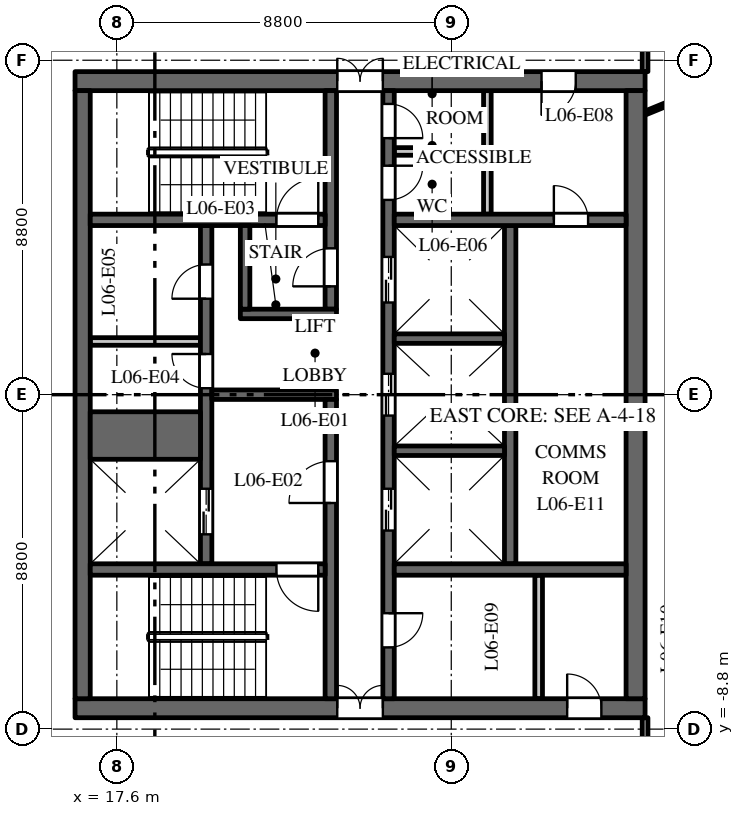
"""IFC4 building model, lengths in metres.
Left out: names, types, materials, properties, quantities, classifications, styles, units other than length and angle.
Written with IfcOpenShell. Run it as: python <this file> out.ifc"""

import sys

from ifc_helpers import new_model, si_unit, direction, frame, frame_2d, origin, place, context, subcontext, project, spatial, rectangle, extrude, element, fill, save


model = new_model("IFC4")
c1 = context("Model", 3, precision=1e-05, world=origin(), true_north=direction((0.0, 1.0)))
c2 = subcontext(c1, "Body", "Model", "MODEL_VIEW")
j1 = project(units=[si_unit("LENGTHUNIT", "METRE"), si_unit("PLANEANGLEUNIT", "RADIAN")], contexts=[c1])
p1 = place(None, origin())
s1 = spatial("IfcSite", under=j1, at=p1, CompositionType="ELEMENT")
p2 = place(p1, origin())
s2 = spatial("IfcBuilding", under=s1, at=p2, CompositionType="ELEMENT")
p3 = place(p2, frame((0.0, 0.0, 34.5)))
s3 = spatial("IfcBuildingStorey", under=s2, at=p3, CompositionType="ELEMENT", Elevation=34.5)
p4 = place(p3, frame((16.5, 8.25, 0.0), z_axis=(0.0, 0.0, 1.0), x_axis=(1.0, 0.0, 0.0)))
e1 = element("IfcWall", 1, at=p4, inside=s3, PredefinedType="SHEAR", context=c2, shape_type="SweptSolid", body=[
    extrude(rectangle(XDim=15.0, YDim=0.5, at=frame_2d((7.5, 0.0))), origin(), (0.0, 0.0, 1.0), 3.7),
])
p5 = place(p4, frame((6.9, 0.0, 0.0)))
e2 = element("IfcOpeningElement", 2, at=p5, cuts=e1, PredefinedType="OPENING", context=c2, shape_type="SweptSolid", body=[
    extrude(rectangle(XDim=1.2, YDim=2.1, at=frame_2d((0.6, 1.05))), frame((0.0, 0.26, 0.0), z_axis=(0.0, -1.0, 0.0), x_axis=(1.0, 0.0, 0.0)), (0.0, 0.0, 1.0), 0.52),
])
p6 = place(p4, frame((12.275, 0.0, 0.0)))
e3 = element("IfcOpeningElement", 3, at=p6, cuts=e1, PredefinedType="OPENING", context=c2, shape_type="SweptSolid", body=[
    extrude(rectangle(XDim=0.9, YDim=2.1, at=frame_2d((0.45, 1.05))), frame((0.0, 0.26, 0.0), z_axis=(0.0, -1.0, 0.0), x_axis=(1.0, 0.0, 0.0)), (0.0, 0.0, 1.0), 0.52),
])
p7 = place(p3, frame((16.5, -8.25, 0.0), z_axis=(0.0, 0.0, 1.0), x_axis=(1.0, 0.0, 0.0)))
e4 = element("IfcWall", 4, at=p7, inside=s3, PredefinedType="SHEAR", context=c2, shape_type="SweptSolid", body=[
    extrude(rectangle(XDim=15.0, YDim=0.5, at=frame_2d((7.5, 0.0))), origin(), (0.0, 0.0, 1.0), 3.7),
])
p8 = place(p7, frame((6.9, 0.0, 0.0)))
e5 = element("IfcOpeningElement", 5, at=p8, cuts=e4, PredefinedType="OPENING", context=c2, shape_type="SweptSolid", body=[
    extrude(rectangle(XDim=1.2, YDim=2.1, at=frame_2d((0.6, 1.05))), frame((0.0, 0.26, 0.0), z_axis=(0.0, -1.0, 0.0), x_axis=(1.0, 0.0, 0.0)), (0.0, 0.0, 1.0), 0.52),
])
p9 = place(p7, frame((12.95, 0.0, 0.0)))
e6 = element("IfcOpeningElement", 6, at=p9, cuts=e4, PredefinedType="OPENING", context=c2, shape_type="SweptSolid", body=[
    extrude(rectangle(XDim=0.9, YDim=2.1, at=frame_2d((0.45, 1.05))), frame((0.0, 0.26, 0.0), z_axis=(0.0, -1.0, 0.0), x_axis=(1.0, 0.0, 0.0)), (0.0, 0.0, 1.0), 0.52),
])
p10 = place(p3, frame((16.9, 1.4, 0.0), z_axis=(0.0, 0.0, 1.0), x_axis=(1.0, 0.0, 0.0)))
e7 = element("IfcWall", 7, at=p10, inside=s3, PredefinedType="PARTITIONING", context=c2, shape_type="SweptSolid", body=[
    extrude(rectangle(XDim=2.9, YDim=0.2, at=frame_2d((1.45, 0.0))), origin(), (0.0, 0.0, 1.0), 3.7),
])
p11 = place(p3, frame((27.95, -4.45, 0.0), z_axis=(0.0, 0.0, 1.0), x_axis=(0.0, 1.0, 0.0)))
e8 = element("IfcWall", 8, at=p11, inside=s3, PredefinedType="SHEAR", context=c2, shape_type="SweptSolid", body=[
    extrude(rectangle(XDim=8.9, YDim=0.3, at=frame_2d((4.45, 0.0))), origin(), (0.0, 0.0, 1.0), 3.7),
])
p12 = place(p3, frame((19.95, -4.45, 0.0), z_axis=(0.0, 0.0, 1.0), x_axis=(0.0, 1.0, 0.0)))
e9 = element("IfcWall", 9, at=p12, inside=s3, PredefinedType="SHEAR", context=c2, shape_type="SweptSolid", body=[
    extrude(rectangle(XDim=8.9, YDim=0.3, at=frame_2d((4.45, 0.0))), origin(), (0.0, 0.0, 1.0), 3.7),
])
p13 = place(p12, frame((0.775, 0.0, 0.0)))
e10 = element("IfcOpeningElement", 10, at=p13, cuts=e9, PredefinedType="OPENING", context=c2, shape_type="SweptSolid", body=[
    extrude(rectangle(XDim=1.2, YDim=2.1, at=frame_2d((0.6, 1.05))), frame((0.0, 0.16, 0.0), z_axis=(0.0, -1.0, 0.0), x_axis=(1.0, 0.0, 0.0)), (0.0, 0.0, 1.0), 0.32),
])
p14 = place(p12, frame((4.62, 0.0, 0.0)))
e11 = element("IfcOpeningElement", 11, at=p14, cuts=e9, PredefinedType="OPENING", context=c2, shape_type="SweptSolid", body=[
    extrude(rectangle(XDim=0.9, YDim=2.1, at=frame_2d((0.45, 1.05))), frame((0.0, 0.16, 0.0), z_axis=(0.0, -1.0, 0.0), x_axis=(1.0, 0.0, 0.0)), (0.0, 0.0, 1.0), 0.32),
])
p15 = place(p12, frame((6.975, 0.0, 0.0)))
e12 = element("IfcOpeningElement", 12, at=p15, cuts=e9, PredefinedType="OPENING", context=c2, shape_type="SweptSolid", body=[
    extrude(rectangle(XDim=0.9, YDim=2.1, at=frame_2d((0.45, 1.05))), frame((0.0, 0.16, 0.0), z_axis=(0.0, -1.0, 0.0), x_axis=(1.0, 0.0, 0.0)), (0.0, 0.0, 1.0), 0.32),
])
p16 = place(p3, frame((24.75, -8.0, 0.0), z_axis=(0.0, 0.0, 1.0), x_axis=(0.0, 1.0, 0.0)))
e13 = element("IfcWall", 13, at=p16, inside=s3, PredefinedType="SHEAR", context=c2, shape_type="SweptSolid", body=[
    extrude(rectangle(XDim=16.0, YDim=0.3, at=frame_2d((8.0, 0.0))), origin(), (0.0, 0.0, 1.0), 3.7),
])
p17 = place(p16, frame((4.425, 0.0, 0.0)))
e14 = element("IfcOpeningElement", 14, at=p17, cuts=e13, PredefinedType="OPENING", context=c2, shape_type="SweptSolid", body=[
    extrude(rectangle(XDim=1.1, YDim=2.1, at=frame_2d((0.55, 1.05))), frame((0.0, 0.16, 0.0), z_axis=(0.0, -1.0, 0.0), x_axis=(1.0, 0.0, 0.0)), (0.0, 0.0, 1.0), 0.32),
])
p18 = place(p16, frame((7.45, 0.0, 0.0)))
e15 = element("IfcOpeningElement", 15, at=p18, cuts=e13, PredefinedType="OPENING", context=c2, shape_type="SweptSolid", body=[
    extrude(rectangle(XDim=1.1, YDim=2.1, at=frame_2d((0.55, 1.05))), frame((0.0, 0.16, 0.0), z_axis=(0.0, -1.0, 0.0), x_axis=(1.0, 0.0, 0.0)), (0.0, 0.0, 1.0), 0.32),
])
p19 = place(p16, frame((10.425, 0.0, 0.0)))
e16 = element("IfcOpeningElement", 16, at=p19, cuts=e13, PredefinedType="OPENING", context=c2, shape_type="SweptSolid", body=[
    extrude(rectangle(XDim=1.2, YDim=2.1, at=frame_2d((0.6, 1.05))), frame((0.0, 0.16, 0.0), z_axis=(0.0, -1.0, 0.0), x_axis=(1.0, 0.0, 0.0)), (0.0, 0.0, 1.0), 0.32),
])
p20 = place(p16, frame((13.125, 0.0, 0.0)))
e17 = element("IfcOpeningElement", 17, at=p20, cuts=e13, PredefinedType="OPENING", context=c2, shape_type="SweptSolid", body=[
    extrude(rectangle(XDim=0.9, YDim=2.1, at=frame_2d((0.45, 1.05))), frame((0.0, 0.16, 0.0), z_axis=(0.0, -1.0, 0.0), x_axis=(1.0, 0.0, 0.0)), (0.0, 0.0, 1.0), 0.32),
])
p21 = place(p16, frame((14.75, 0.0, 0.0)))
e18 = element("IfcOpeningElement", 18, at=p21, cuts=e13, PredefinedType="OPENING", context=c2, shape_type="SweptSolid", body=[
    extrude(rectangle(XDim=0.9, YDim=2.1, at=frame_2d((0.45, 1.05))), frame((0.0, 0.16, 0.0), z_axis=(0.0, -1.0, 0.0), x_axis=(1.0, 0.0, 0.0)), (0.0, 0.0, 1.0), 0.32),
])
p22 = place(p16, frame((1.35, 0.0, 0.0)))
e19 = element("IfcOpeningElement", 19, at=p22, cuts=e13, PredefinedType="OPENING", context=c2, shape_type="SweptSolid", body=[
    extrude(rectangle(XDim=0.9, YDim=2.1, at=frame_2d((0.45, 1.05))), frame((0.0, 0.16, 0.0), z_axis=(0.0, -1.0, 0.0), x_axis=(1.0, 0.0, 0.0)), (0.0, 0.0, 1.0), 0.32),
])
p23 = place(p3, frame((20.1, 0.0, 0.0), z_axis=(0.0, 0.0, 1.0), x_axis=(1.0, 0.0, 0.0)))
e20 = element("IfcWall", 20, at=p23, inside=s3, PredefinedType="SHEAR", context=c2, shape_type="SweptSolid", body=[
    extrude(rectangle(XDim=3.28, YDim=0.25, at=frame_2d((1.64, 0.0))), origin(), (0.0, 0.0, 1.0), 3.7),
])
p24 = place(p3, frame((16.7, -8.0, 0.0), z_axis=(0.0, 0.0, 1.0), x_axis=(0.0, 1.0, 0.0)))
e21 = element("IfcWall", 21, at=p24, inside=s3, PredefinedType="SHEAR", context=c2, shape_type="SweptSolid", body=[
    extrude(rectangle(XDim=16.0, YDim=0.4, at=frame_2d((8.0, 0.0))), origin(), (0.0, 0.0, 1.0), 3.7),
])
p25 = place(p3, frame((31.25, -8.0, 0.0), z_axis=(0.0, 0.0, 1.0), x_axis=(0.0, 1.0, 0.0)))
e22 = element("IfcWall", 22, at=p25, inside=s3, PredefinedType="SHEAR", context=c2, shape_type="SweptSolid", body=[
    extrude(rectangle(XDim=16.0, YDim=0.5, at=frame_2d((8.0, 0.0))), origin(), (0.0, 0.0, 1.0), 3.7),
])
p26 = place(p3, frame((24.9, 4.6, 0.0), z_axis=(0.0, 0.0, 1.0), x_axis=(1.0, 0.0, 0.0)))
e23 = element("IfcWall", 23, at=p26, inside=s3, PredefinedType="SHEAR", context=c2, shape_type="SweptSolid", body=[
    extrude(rectangle(XDim=6.1, YDim=0.3, at=frame_2d((3.05, 0.0))), origin(), (0.0, 0.0, 1.0), 3.7),
])
p27 = place(p26, frame((4.2, 0.0, 0.0)))
e24 = element("IfcOpeningElement", 24, at=p27, cuts=e23, PredefinedType="OPENING", context=c2, shape_type="SweptSolid", body=[
    extrude(rectangle(XDim=0.9, YDim=2.1, at=frame_2d((0.45, 1.05))), frame((0.0, 0.16, 0.0), z_axis=(0.0, -1.0, 0.0), x_axis=(1.0, 0.0, 0.0)), (0.0, 0.0, 1.0), 0.32),
])
for number, where, z_axis, x_axis in (
    (25, (27.35, 4.75, 0.0), (0.0, 0.0, 1.0), (0.0, 1.0, 0.0)),
    (26, (28.7, -8.0, 0.0), (0.0, 0.0, 1.0), (0.0, 1.0, 0.0)),
):
    element("IfcWall", number, at=place(p3, frame(where, z_axis=z_axis, x_axis=x_axis)), inside=s3, PredefinedType="PARTITIONING", context=c2, shape_type="SweptSolid", body=[
        extrude(rectangle(XDim=3.25, YDim=0.2, at=frame_2d((1.625, 0.0))), origin(), (0.0, 0.0, 1.0), 3.7),
    ])
p28 = place(p3, frame((24.9, 6.4, 0.0), z_axis=(0.0, 0.0, 1.0), x_axis=(1.0, 0.0, 0.0)))
e27 = element("IfcWall", 27, at=p28, inside=s3, PredefinedType="PARTITIONING", context=c2, shape_type="SweptSolid", body=[
    extrude(rectangle(XDim=2.35, YDim=0.2, at=frame_2d((1.175, 0.0))), origin(), (0.0, 0.0, 1.0), 3.7),
])
p29 = place(p3, frame((24.9, -4.6, 0.0), z_axis=(0.0, 0.0, 1.0), x_axis=(1.0, 0.0, 0.0)))
e28 = element("IfcWall", 28, at=p29, inside=s3, PredefinedType="SHEAR", context=c2, shape_type="SweptSolid", body=[
    extrude(rectangle(XDim=6.1, YDim=0.3, at=frame_2d((3.05, 0.0))), origin(), (0.0, 0.0, 1.0), 3.7),
])
p30 = place(p3, frame((16.9, -1.075, 0.0), z_axis=(0.0, 0.0, 1.0), x_axis=(1.0, 0.0, 0.0)))
e29 = element("IfcWall", 29, at=p30, inside=s3, PredefinedType="SHEAR", context=c2, shape_type="SweptSolid", body=[
    extrude(rectangle(XDim=2.9, YDim=1.25, at=frame_2d((1.45, 0.0))), origin(), (0.0, 0.0, 1.0), 3.7),
])
for number, where, z_axis, x_axis in (
    (30, (24.9, -1.475, 0.0), (0.0, 0.0, 1.0), (1.0, 0.0, 0.0)),
    (31, (24.9, 1.475, 0.0), (0.0, 0.0, 1.0), (1.0, 0.0, 0.0)),
):
    element("IfcWall", number, at=place(p3, frame(where, z_axis=z_axis, x_axis=x_axis)), inside=s3, PredefinedType="SHEAR", context=c2, shape_type="SweptSolid", body=[
        extrude(rectangle(XDim=2.9, YDim=0.25, at=frame_2d((1.45, 0.0))), origin(), (0.0, 0.0, 1.0), 3.7),
    ])
p31 = place(p3, frame((23.23, 2.25, 0.0), z_axis=(0.0, 0.0, 1.0), x_axis=(0.0, 1.0, 0.0)))
e32 = element("IfcWall", 32, at=p31, inside=s3, PredefinedType="SHEAR", context=c2, shape_type="SweptSolid", body=[
    extrude(rectangle(XDim=5.75, YDim=0.3, at=frame_2d((2.875, 0.0))), origin(), (0.0, 0.0, 1.0), 3.7),
])
p32 = place(p31, frame((0.6, 0.0, 0.0)))
e33 = element("IfcOpeningElement", 33, at=p32, cuts=e32, PredefinedType="OPENING", context=c2, shape_type="SweptSolid", body=[
    extrude(rectangle(XDim=1.0, YDim=2.1, at=frame_2d((0.5, 1.05))), frame((0.0, 0.16, 0.0), z_axis=(0.0, -1.0, 0.0), x_axis=(1.0, 0.0, 0.0)), (0.0, 0.0, 1.0), 0.32),
])
p33 = place(p3, frame((23.23, -8.0, 0.0), z_axis=(0.0, 0.0, 1.0), x_axis=(0.0, 1.0, 0.0)))
e34 = element("IfcWall", 34, at=p33, inside=s3, PredefinedType="SHEAR", context=c2, shape_type="SweptSolid", body=[
    extrude(rectangle(XDim=7.875, YDim=0.3, at=frame_2d((3.938, 0.0))), origin(), (0.0, 0.0, 1.0), 3.7),
])
p34 = place(p33, frame((5.15, 0.0, 0.0)))
e35 = element("IfcOpeningElement", 35, at=p34, cuts=e34, PredefinedType="OPENING", context=c2, shape_type="SweptSolid", body=[
    extrude(rectangle(XDim=1.1, YDim=2.1, at=frame_2d((0.55, 1.05))), frame((0.0, 0.16, 0.0), z_axis=(0.0, -1.0, 0.0), x_axis=(1.0, 0.0, 0.0)), (0.0, 0.0, 1.0), 0.32),
])
p35 = place(p3, frame((16.9, 4.6, 0.0), z_axis=(0.0, 0.0, 1.0), x_axis=(1.0, 0.0, 0.0)))
e36 = element("IfcWall", 36, at=p35, inside=s3, PredefinedType="SHEAR", context=c2, shape_type="SweptSolid", body=[
    extrude(rectangle(XDim=6.18, YDim=0.3, at=frame_2d((3.09, 0.0))), origin(), (0.0, 0.0, 1.0), 3.7),
])
p36 = place(p35, frame((4.9, 0.0, 0.0)))
e37 = element("IfcOpeningElement", 37, at=p36, cuts=e36, PredefinedType="OPENING", context=c2, shape_type="SweptSolid", body=[
    extrude(rectangle(XDim=1.1, YDim=2.1, at=frame_2d((0.55, 1.05))), frame((0.0, 0.16, 0.0), z_axis=(0.0, -1.0, 0.0), x_axis=(1.0, 0.0, 0.0)), (0.0, 0.0, 1.0), 0.32),
])
p37 = place(p3, frame((16.9, -4.6, 0.0), z_axis=(0.0, 0.0, 1.0), x_axis=(1.0, 0.0, 0.0)))
e38 = element("IfcWall", 38, at=p37, inside=s3, PredefinedType="SHEAR", context=c2, shape_type="SweptSolid", body=[
    extrude(rectangle(XDim=6.18, YDim=0.3, at=frame_2d((3.09, 0.0))), origin(), (0.0, 0.0, 1.0), 3.7),
])
p38 = place(p37, frame((4.9, 0.0, 0.0)))
e39 = element("IfcOpeningElement", 39, at=p38, cuts=e38, PredefinedType="OPENING", context=c2, shape_type="SweptSolid", body=[
    extrude(rectangle(XDim=1.1, YDim=2.1, at=frame_2d((0.55, 1.05))), frame((0.0, 0.16, 0.0), z_axis=(0.0, -1.0, 0.0), x_axis=(1.0, 0.0, 0.0)), (0.0, 0.0, 1.0), 0.32),
])
p39 = place(p3, frame((20.85, 2.125, 0.0), z_axis=(0.0, 0.0, 1.0), x_axis=(1.0, 0.0, 0.0)))
e40 = element("IfcWall", 40, at=p39, inside=s3, PredefinedType="SHEAR", context=c2, shape_type="SweptSolid", body=[
    extrude(rectangle(XDim=2.53, YDim=0.25, at=frame_2d((1.265, 0.0))), origin(), (0.0, 0.0, 1.0), 3.7),
])
p40 = place(p3, frame((20.975, 2.25, 0.0), z_axis=(0.0, 0.0, 1.0), x_axis=(0.0, 1.0, 0.0)))
e41 = element("IfcWall", 41, at=p40, inside=s3, PredefinedType="SHEAR", context=c2, shape_type="SweptSolid", body=[
    extrude(rectangle(XDim=2.2, YDim=0.25, at=frame_2d((1.1, 0.0))), origin(), (0.0, 0.0, 1.0), 3.7),
])
p41 = place(p3, frame((31.5, -10.7, 0.0), z_axis=(0.0, 0.0, 1.0), x_axis=(0.0, 1.0, 0.0)))
e42 = element("IfcWall", 42, at=p41, inside=s3, PredefinedType="PARTITIONING", context=c2, shape_type="SweptSolid", body=[
    extrude(rectangle(XDim=2.2, YDim=0.15, at=frame_2d((1.1, 0.0))), origin(), (0.0, 0.0, 1.0), 2.85),
])
p42 = place(p3, frame((31.5, 7.41, 0.0), z_axis=(0.0, 0.0, 1.0), x_axis=(0.925344112436, 0.379128307542, 0.0)))
e43 = element("IfcWall", 43, at=p42, inside=s3, PredefinedType="PARTITIONING", context=c2, shape_type="SweptSolid", body=[
    extrude(rectangle(XDim=2.954, YDim=0.1, at=frame_2d((1.477, 0.0))), origin(), (0.0, 0.0, 1.0), 3.7),
])
p43 = place(p3, frame((31.5, 8.5, 0.0), z_axis=(0.0, 0.0, 1.0), x_axis=(0.0, 1.0, 0.0)))
e44 = element("IfcWall", 44, at=p43, inside=s3, PredefinedType="PARTITIONING", context=c2, shape_type="SweptSolid", body=[
    extrude(rectangle(XDim=2.2, YDim=0.15, at=frame_2d((1.1, 0.0))), origin(), (0.0, 0.0, 1.0), 2.85),
])
p44 = place(p13, origin())
e45 = element("IfcDoor", 45, at=p44, inside=s3, OperationType="DOUBLE_DOOR_SLIDING", PredefinedType="DOOR", context=c2, shape_type="SweptSolid", body=[
    extrude(rectangle(XDim=1.2, YDim=2.1, at=frame_2d((0.6, 1.05))), frame((0.0, 0.025, 0.0), z_axis=(0.0, -1.0, 0.0), x_axis=(1.0, 0.0, 0.0)), (0.0, 0.0, 1.0), 0.05),
])
fill(e10, e45)
p45 = place(p17, origin())
e46 = element("IfcDoor", 46, at=p45, inside=s3, OperationType="DOUBLE_DOOR_SLIDING", PredefinedType="DOOR", context=c2, shape_type="SweptSolid", body=[
    extrude(rectangle(XDim=1.1, YDim=2.1, at=frame_2d((0.55, 1.05))), frame((0.0, 0.025, 0.0), z_axis=(0.0, -1.0, 0.0), x_axis=(1.0, 0.0, 0.0)), (0.0, 0.0, 1.0), 0.05),
])
fill(e14, e46)
p46 = place(p18, origin())
e47 = element("IfcDoor", 47, at=p46, inside=s3, OperationType="DOUBLE_DOOR_SLIDING", PredefinedType="DOOR", context=c2, shape_type="SweptSolid", body=[
    extrude(rectangle(XDim=1.1, YDim=2.1, at=frame_2d((0.55, 1.05))), frame((0.0, 0.025, 0.0), z_axis=(0.0, -1.0, 0.0), x_axis=(1.0, 0.0, 0.0)), (0.0, 0.0, 1.0), 0.05),
])
fill(e15, e47)
p47 = place(p19, origin())
e48 = element("IfcDoor", 48, at=p47, inside=s3, OperationType="DOUBLE_DOOR_SLIDING", PredefinedType="DOOR", context=c2, shape_type="SweptSolid", body=[
    extrude(rectangle(XDim=1.2, YDim=2.1, at=frame_2d((0.6, 1.05))), frame((0.0, 0.025, 0.0), z_axis=(0.0, -1.0, 0.0), x_axis=(1.0, 0.0, 0.0)), (0.0, 0.0, 1.0), 0.05),
])
fill(e16, e48)
p48 = place(p36, origin())
e49 = element("IfcDoor", 49, at=p48, inside=s3, OperationType="SINGLE_SWING_LEFT", PredefinedType="DOOR", context=c2, shape_type="SweptSolid", body=[
    extrude(rectangle(XDim=1.1, YDim=2.1, at=frame_2d((0.55, 1.05))), frame((0.0, 0.025, 0.0), z_axis=(0.0, -1.0, 0.0), x_axis=(1.0, 0.0, 0.0)), (0.0, 0.0, 1.0), 0.05),
])
fill(e37, e49)
p49 = place(p38, origin())
e50 = element("IfcDoor", 50, at=p49, inside=s3, OperationType="SINGLE_SWING_RIGHT", PredefinedType="DOOR", context=c2, shape_type="SweptSolid", body=[
    extrude(rectangle(XDim=1.1, YDim=2.1, at=frame_2d((0.55, 1.05))), frame((0.0, 0.025, 0.0), z_axis=(0.0, -1.0, 0.0), x_axis=(1.0, 0.0, 0.0)), (0.0, 0.0, 1.0), 0.05),
])
fill(e39, e50)
p50 = place(p34, origin())
e51 = element("IfcDoor", 51, at=p50, inside=s3, OperationType="SINGLE_SWING_RIGHT", PredefinedType="DOOR", context=c2, shape_type="SweptSolid", body=[
    extrude(rectangle(XDim=1.1, YDim=2.1, at=frame_2d((0.55, 1.05))), frame((0.0, 0.025, 0.0), z_axis=(0.0, -1.0, 0.0), x_axis=(1.0, 0.0, 0.0)), (0.0, 0.0, 1.0), 0.05),
])
fill(e35, e51)
p51 = place(p32, origin())
e52 = element("IfcDoor", 52, at=p51, inside=s3, OperationType="SINGLE_SWING_RIGHT", PredefinedType="DOOR", context=c2, shape_type="SweptSolid", body=[
    extrude(rectangle(XDim=1.0, YDim=2.1, at=frame_2d((0.5, 1.05))), frame((0.0, 0.025, 0.0), z_axis=(0.0, -1.0, 0.0), x_axis=(1.0, 0.0, 0.0)), (0.0, 0.0, 1.0), 0.05),
])
fill(e33, e52)
p52 = place(p5, origin())
e53 = element("IfcDoor", 53, at=p52, inside=s3, OperationType="DOUBLE_DOOR_DOUBLE_SWING", PredefinedType="DOOR", context=c2, shape_type="SweptSolid", body=[
    extrude(rectangle(XDim=1.2, YDim=2.1, at=frame_2d((0.6, 1.05))), frame((0.0, 0.025, 0.0), z_axis=(0.0, -1.0, 0.0), x_axis=(1.0, 0.0, 0.0)), (0.0, 0.0, 1.0), 0.05),
])
fill(e2, e53)
p53 = place(p8, origin())
e54 = element("IfcDoor", 54, at=p53, inside=s3, OperationType="DOUBLE_DOOR_DOUBLE_SWING", PredefinedType="DOOR", context=c2, shape_type="SweptSolid", body=[
    extrude(rectangle(XDim=1.2, YDim=2.1, at=frame_2d((0.6, 1.05))), frame((0.0, 0.025, 0.0), z_axis=(0.0, -1.0, 0.0), x_axis=(1.0, 0.0, 0.0)), (0.0, 0.0, 1.0), 0.05),
])
fill(e5, e54)
p54 = place(p14, origin())
e55 = element("IfcDoor", 55, at=p54, inside=s3, OperationType="SINGLE_SWING_LEFT", PredefinedType="DOOR", context=c2, shape_type="SweptSolid", body=[
    extrude(rectangle(XDim=0.9, YDim=2.1, at=frame_2d((0.45, 1.05))), frame((0.0, 0.025, 0.0), z_axis=(0.0, -1.0, 0.0), x_axis=(1.0, 0.0, 0.0)), (0.0, 0.0, 1.0), 0.05),
])
fill(e11, e55)
p55 = place(p15, origin())
e56 = element("IfcDoor", 56, at=p55, inside=s3, OperationType="SINGLE_SWING_RIGHT", PredefinedType="DOOR", context=c2, shape_type="SweptSolid", body=[
    extrude(rectangle(XDim=0.9, YDim=2.1, at=frame_2d((0.45, 1.05))), frame((0.0, 0.025, 0.0), z_axis=(0.0, -1.0, 0.0), x_axis=(1.0, 0.0, 0.0)), (0.0, 0.0, 1.0), 0.05),
])
fill(e12, e56)
p56 = place(p20, origin())
e57 = element("IfcDoor", 57, at=p56, inside=s3, OperationType="SINGLE_SWING_RIGHT", PredefinedType="DOOR", context=c2, shape_type="SweptSolid", body=[
    extrude(rectangle(XDim=0.9, YDim=2.1, at=frame_2d((0.45, 1.05))), frame((0.0, 0.025, 0.0), z_axis=(0.0, -1.0, 0.0), x_axis=(1.0, 0.0, 0.0)), (0.0, 0.0, 1.0), 0.05),
])
fill(e17, e57)
p57 = place(p21, origin())
e58 = element("IfcDoor", 58, at=p57, inside=s3, OperationType="SINGLE_SWING_LEFT", PredefinedType="DOOR", context=c2, shape_type="SweptSolid", body=[
    extrude(rectangle(XDim=0.9, YDim=2.1, at=frame_2d((0.45, 1.05))), frame((0.0, 0.025, 0.0), z_axis=(0.0, -1.0, 0.0), x_axis=(1.0, 0.0, 0.0)), (0.0, 0.0, 1.0), 0.05),
])
fill(e18, e58)
p58 = place(p6, origin())
e59 = element("IfcDoor", 59, at=p58, inside=s3, OperationType="SINGLE_SWING_LEFT", PredefinedType="DOOR", context=c2, shape_type="SweptSolid", body=[
    extrude(rectangle(XDim=0.9, YDim=2.1, at=frame_2d((0.45, 1.05))), frame((0.0, 0.025, 0.0), z_axis=(0.0, -1.0, 0.0), x_axis=(1.0, 0.0, 0.0)), (0.0, 0.0, 1.0), 0.05),
])
fill(e3, e59)
p59 = place(p22, origin())
e60 = element("IfcDoor", 60, at=p59, inside=s3, OperationType="SINGLE_SWING_RIGHT", PredefinedType="DOOR", context=c2, shape_type="SweptSolid", body=[
    extrude(rectangle(XDim=0.9, YDim=2.1, at=frame_2d((0.45, 1.05))), frame((0.0, 0.025, 0.0), z_axis=(0.0, -1.0, 0.0), x_axis=(1.0, 0.0, 0.0)), (0.0, 0.0, 1.0), 0.05),
])
fill(e19, e60)
p60 = place(p9, origin())
e61 = element("IfcDoor", 61, at=p60, inside=s3, OperationType="SINGLE_SWING_RIGHT", PredefinedType="DOOR", context=c2, shape_type="SweptSolid", body=[
    extrude(rectangle(XDim=0.9, YDim=2.1, at=frame_2d((0.45, 1.05))), frame((0.0, 0.025, 0.0), z_axis=(0.0, -1.0, 0.0), x_axis=(1.0, 0.0, 0.0)), (0.0, 0.0, 1.0), 0.05),
])
fill(e6, e61)
p61 = place(p27, origin())
e62 = element("IfcDoor", 62, at=p61, inside=s3, OperationType="SINGLE_SWING_RIGHT", PredefinedType="DOOR", context=c2, shape_type="SweptSolid", body=[
    extrude(rectangle(XDim=0.9, YDim=2.1, at=frame_2d((0.45, 1.05))), frame((0.0, 0.025, 0.0), z_axis=(0.0, -1.0, 0.0), x_axis=(1.0, 0.0, 0.0)), (0.0, 0.0, 1.0), 0.05),
])
fill(e24, e62)
save(model, sys.argv[1])
